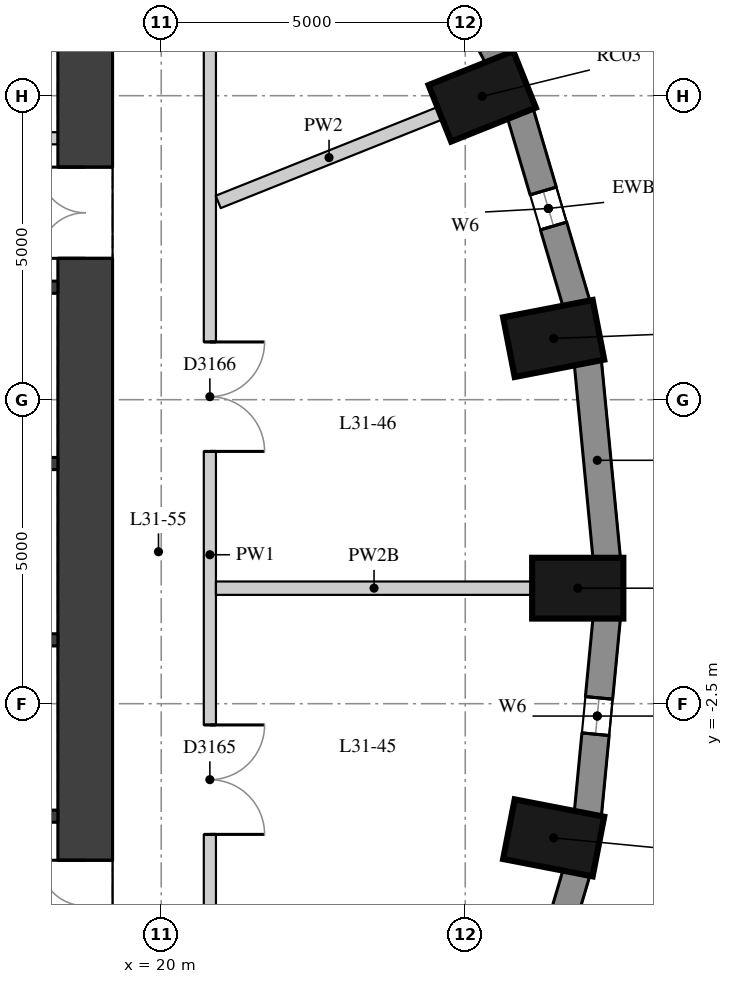
"""IFC4 building model, lengths in metres.
Left out: names, types, materials, properties, quantities, classifications, styles, units other than length and angle.
Written with IfcOpenShell. Run it as: python <this file> out.ifc"""

import sys

from ifc_helpers import new_model, si_unit, direction, frame, frame_2d, origin, origin_2d, place, context, subcontext, project, spatial, rectangle, extrude, element, fill, save


model = new_model("IFC4")
c1 = context("Model", 3, precision=1e-05, world=origin(), true_north=direction((0.0, 1.0)))
c2 = subcontext(c1, "Body", "Model", "MODEL_VIEW")
j1 = project(units=[si_unit("LENGTHUNIT", "METRE"), si_unit("PLANEANGLEUNIT", "RADIAN")], contexts=[c1])
p1 = place(None, origin())
s1 = spatial("IfcSite", under=j1, at=p1, CompositionType="ELEMENT")
p2 = place(p1, origin())
s2 = spatial("IfcBuilding", under=s1, at=p2, CompositionType="ELEMENT")
p3 = place(p2, frame((0.0, 0.0, 112.0)))
s3 = spatial("IfcBuildingStorey", under=s2, at=p3, CompositionType="ELEMENT", Elevation=112.0)
for number, where, z_axis, x_axis in (
    (1, (26.85, -0.6, 0.0), (0.0, 0.0, 1.0), (1.0, 0.0, 0.0)),
    (2, (26.454, 3.507, 0.0), (0.0, 0.0, 1.0), (0.982, 0.19, 0.0)),
    (3, (25.279, 7.489, 0.0), (0.0, 0.0, 1.0), (0.929, 0.371, 0.0)),
    (4, (26.454, -4.707, 0.0), (0.0, 0.0, 1.0), (0.982, -0.19, 0.0)),
):
    element("IfcColumn", number, at=place(p3, frame(where, z_axis=z_axis, x_axis=x_axis)), inside=s3, PredefinedType="COLUMN", context=c2, shape_type="SweptSolid", body=[
        extrude(rectangle(XDim=1.5, YDim=1.0, at=origin_2d()), origin(), (0.0, 0.0, 1.0), 3.3),
    ])
p4 = place(p3, frame((27.328, -0.12, 0.0), z_axis=(0.0, 0.0, 1.0), x_axis=(-0.09589355735, 0.995391594127, 0.0)))
e5 = element("IfcWall", 5, at=p4, inside=s3, PredefinedType="SOLIDWALL", context=c2, shape_type="SweptSolid", body=[
    extrude(rectangle(XDim=3.261, YDim=0.45, at=frame_2d((1.631, 0.0))), origin(), (0.0, 0.0, 1.0), 3.02),
])
p5 = place(p3, frame((26.832, 4.069, 0.0), z_axis=(0.0, 0.0, 1.0), x_axis=(-0.283002902729, 0.959119052593, 0.0)))
e6 = element("IfcWall", 6, at=p5, inside=s3, PredefinedType="SOLIDWALL", context=c2, shape_type="SweptSolid", body=[
    extrude(rectangle(XDim=3.286, YDim=0.45, at=frame_2d((1.643, 0.0))), origin(), (0.0, 0.0, 1.0), 3.02),
])
p6 = place(p5, frame((1.343, 0.0, 0.4)))
e7 = element("IfcOpeningElement", 7, at=p6, cuts=e6, PredefinedType="OPENING", context=c2, shape_type="SweptSolid", body=[
    extrude(rectangle(XDim=0.6, YDim=1.75, at=frame_2d((0.3, 0.875))), frame((0.0, 0.235, 0.0), z_axis=(0.0, -1.0, 0.0), x_axis=(1.0, 0.0, 0.0)), (0.0, 0.0, 1.0), 0.47),
])
p7 = place(p3, frame((25.545, 8.112, 0.0), z_axis=(0.0, 0.0, 1.0), x_axis=(-0.456828186229, 0.889554949549, 0.0)))
e8 = element("IfcWall", 8, at=p7, inside=s3, PredefinedType="SOLIDWALL", context=c2, shape_type="SweptSolid", body=[
    extrude(rectangle(XDim=3.333, YDim=0.45, at=frame_2d((1.667, 0.0))), origin(), (0.0, 0.0, 1.0), 3.02),
])
p8 = place(p3, frame((25.902, -8.421, 0.0), z_axis=(0.0, 0.0, 1.0), x_axis=(0.282982737009, 0.95912500257, 0.0)))
e9 = element("IfcWall", 9, at=p8, inside=s3, PredefinedType="SOLIDWALL", context=c2, shape_type="SweptSolid", body=[
    extrude(rectangle(XDim=3.286, YDim=0.45, at=frame_2d((1.643, 0.0))), origin(), (0.0, 0.0, 1.0), 3.02),
])
p9 = place(p3, frame((27.015, -4.326, 0.0), z_axis=(0.0, 0.0, 1.0), x_axis=(0.09589355735, 0.995391594127, 0.0)))
e10 = element("IfcWall", 10, at=p9, inside=s3, PredefinedType="SOLIDWALL", context=c2, shape_type="SweptSolid", body=[
    extrude(rectangle(XDim=3.261, YDim=0.45, at=frame_2d((1.631, 0.0))), origin(), (0.0, 0.0, 1.0), 3.02),
])
p10 = place(p9, frame((1.331, 0.0, 0.4)))
e11 = element("IfcOpeningElement", 11, at=p10, cuts=e10, PredefinedType="OPENING", context=c2, shape_type="SweptSolid", body=[
    extrude(rectangle(XDim=0.6, YDim=1.75, at=frame_2d((0.3, 0.875))), frame((0.0, 0.235, 0.0), z_axis=(0.0, -1.0, 0.0), x_axis=(1.0, 0.0, 0.0)), (0.0, 0.0, 1.0), 0.47),
])
p11 = place(p3, frame((18.75, -11.1, 0.0), z_axis=(0.0, 0.0, 1.0), x_axis=(0.0, 1.0, 0.0)))
e12 = element("IfcWall", 12, at=p11, inside=s3, PredefinedType="SHEAR", context=c2, shape_type="SweptSolid", body=[
    extrude(rectangle(XDim=22.2, YDim=0.9, at=frame_2d((11.1, 0.0))), origin(), (0.0, 0.0, 1.0), 3.02),
])
p12 = place(p11, frame((15.925, 0.0, 0.0)))
e13 = element("IfcOpeningElement", 13, at=p12, cuts=e12, PredefinedType="OPENING", context=c2, shape_type="SweptSolid", body=[
    extrude(rectangle(XDim=1.5, YDim=2.1, at=frame_2d((0.75, 1.05))), frame((0.0, 0.46, 0.0), z_axis=(0.0, -1.0, 0.0), x_axis=(1.0, 0.0, 0.0)), (0.0, 0.0, 1.0), 0.92),
])
p13 = place(p11, frame((4.525, 0.0, 0.0)))
e14 = element("IfcOpeningElement", 14, at=p13, cuts=e12, PredefinedType="OPENING", context=c2, shape_type="SweptSolid", body=[
    extrude(rectangle(XDim=1.5, YDim=2.1, at=frame_2d((0.75, 1.05))), frame((0.0, 0.46, 0.0), z_axis=(0.0, -1.0, 0.0), x_axis=(1.0, 0.0, 0.0)), (0.0, 0.0, 1.0), 0.92),
])
for number, where, z_axis, x_axis in (
    (15, (16.0, -4.35, 0.0), (0.0, 0.0, 1.0), (1.0, 0.0, 0.0)),
    (16, (16.0, -1.45, 0.0), (0.0, 0.0, 1.0), (1.0, 0.0, 0.0)),
    (17, (16.0, 1.45, 0.0), (0.0, 0.0, 1.0), (1.0, 0.0, 0.0)),
    (18, (16.0, 4.35, 0.0), (0.0, 0.0, 1.0), (1.0, 0.0, 0.0)),
):
    element("IfcWall", number, at=place(p3, frame(where, z_axis=z_axis, x_axis=x_axis)), inside=s3, PredefinedType="SHEAR", context=c2, shape_type="SweptSolid", body=[
        extrude(rectangle(XDim=2.3, YDim=0.2, at=frame_2d((1.15, 0.0))), origin(), (0.0, 0.0, 1.0), 3.02),
    ])
p14 = place(p3, frame((16.0, 6.8, 0.0), z_axis=(0.0, 0.0, 1.0), x_axis=(1.0, 0.0, 0.0)))
e19 = element("IfcWall", 19, at=p14, inside=s3, PredefinedType="PARTITIONING", context=c2, shape_type="SweptSolid", body=[
    extrude(rectangle(XDim=2.3, YDim=0.2, at=frame_2d((1.15, 0.0))), origin(), (0.0, 0.0, 1.0), 3.02),
])
p15 = place(p14, frame((0.1, 0.0, 0.0)))
e20 = element("IfcOpeningElement", 20, at=p15, cuts=e19, PredefinedType="OPENING", context=c2, shape_type="SweptSolid", body=[
    extrude(rectangle(XDim=0.9, YDim=2.1, at=frame_2d((0.45, 1.05))), frame((0.0, 0.11, 0.0), z_axis=(0.0, -1.0, 0.0), x_axis=(1.0, 0.0, 0.0)), (0.0, 0.0, 1.0), 0.22),
])
p16 = place(p3, frame((20.8, 13.5, 0.0), z_axis=(0.0, 0.0, 1.0), x_axis=(0.0, -1.0, 0.0)))
e21 = element("IfcWall", 21, at=p16, inside=s3, PredefinedType="PARTITIONING", context=c2, shape_type="SweptSolid", body=[
    extrude(rectangle(XDim=27.1, YDim=0.2, at=frame_2d((13.55, 0.0))), origin(), (0.0, 0.0, 1.0), 3.02),
])
p17 = place(p16, frame((22.844, 0.0, 0.0)))
e22 = element("IfcOpeningElement", 22, at=p17, cuts=e21, PredefinedType="OPENING", context=c2, shape_type="SweptSolid", body=[
    extrude(rectangle(XDim=1.8, YDim=2.1, at=frame_2d((0.9, 1.05))), frame((0.0, 0.11, 0.0), z_axis=(0.0, -1.0, 0.0), x_axis=(1.0, 0.0, 0.0)), (0.0, 0.0, 1.0), 0.22),
])
p18 = place(p16, frame((16.35, 0.0, 0.0)))
e23 = element("IfcOpeningElement", 23, at=p18, cuts=e21, PredefinedType="OPENING", context=c2, shape_type="SweptSolid", body=[
    extrude(rectangle(XDim=1.8, YDim=2.1, at=frame_2d((0.9, 1.05))), frame((0.0, 0.11, 0.0), z_axis=(0.0, -1.0, 0.0), x_axis=(1.0, 0.0, 0.0)), (0.0, 0.0, 1.0), 0.22),
])
p19 = place(p16, frame((10.051, 0.0, 0.0)))
e24 = element("IfcOpeningElement", 24, at=p19, cuts=e21, PredefinedType="OPENING", context=c2, shape_type="SweptSolid", body=[
    extrude(rectangle(XDim=1.8, YDim=2.1, at=frame_2d((0.9, 1.05))), frame((0.0, 0.11, 0.0), z_axis=(0.0, -1.0, 0.0), x_axis=(1.0, 0.0, 0.0)), (0.0, 0.0, 1.0), 0.22),
])
p20 = place(p3, frame((26.1, -0.6, 0.0), z_axis=(0.0, 0.0, 1.0), x_axis=(-1.0, 0.0, 0.0)))
e25 = element("IfcWall", 25, at=p20, inside=s3, PredefinedType="PARTITIONING", context=c2, shape_type="SweptSolid", body=[
    extrude(rectangle(XDim=5.2, YDim=0.22, at=frame_2d((2.6, 0.0))), origin(), (0.0, 0.0, 1.0), 2.57),
])
p21 = place(p3, frame((24.583, 7.21, 0.0), z_axis=(0.0, 0.0, 1.0), x_axis=(-0.928528147853, -0.371262008083, 0.0)))
e26 = element("IfcWall", 26, at=p21, inside=s3, PredefinedType="PARTITIONING", context=c2, shape_type="SweptSolid", body=[
    extrude(rectangle(XDim=3.926, YDim=0.22, at=frame_2d((1.963, 0.0))), origin(), (0.0, 0.0, 1.0), 3.02),
])
p22 = place(p6, origin())
e27 = element("IfcWindow", 27, at=p22, inside=s3, PartitioningType="SINGLE_PANEL", PredefinedType="WINDOW", context=c2, shape_type="SweptSolid", body=[
    extrude(rectangle(XDim=0.6, YDim=1.75, at=frame_2d((0.3, 0.875))), frame((0.0, 0.035, 0.0), z_axis=(0.0, -1.0, 0.0), x_axis=(1.0, 0.0, 0.0)), (0.0, 0.0, 1.0), 0.06),
])
fill(e7, e27)
p23 = place(p10, origin())
e28 = element("IfcWindow", 28, at=p23, inside=s3, PartitioningType="SINGLE_PANEL", PredefinedType="WINDOW", context=c2, shape_type="SweptSolid", body=[
    extrude(rectangle(XDim=0.6, YDim=1.75, at=frame_2d((0.3, 0.875))), frame((0.0, 0.035, 0.0), z_axis=(0.0, -1.0, 0.0), x_axis=(1.0, 0.0, 0.0)), (0.0, 0.0, 1.0), 0.06),
])
fill(e11, e28)
p24 = place(p12, origin())
e29 = element("IfcDoor", 29, at=p24, inside=s3, OperationType="DOUBLE_DOOR_SINGLE_SWING", PredefinedType="DOOR", context=c2, shape_type="SweptSolid", body=[
    extrude(rectangle(XDim=1.5, YDim=2.1, at=frame_2d((0.75, 1.05))), frame((0.0, 0.025, 0.0), z_axis=(0.0, -1.0, 0.0), x_axis=(1.0, 0.0, 0.0)), (0.0, 0.0, 1.0), 0.05),
])
fill(e13, e29)
p25 = place(p13, origin())
e30 = element("IfcDoor", 30, at=p25, inside=s3, OperationType="DOUBLE_DOOR_SINGLE_SWING", PredefinedType="DOOR", context=c2, shape_type="SweptSolid", body=[
    extrude(rectangle(XDim=1.5, YDim=2.1, at=frame_2d((0.75, 1.05))), frame((0.0, 0.025, 0.0), z_axis=(0.0, -1.0, 0.0), x_axis=(1.0, 0.0, 0.0)), (0.0, 0.0, 1.0), 0.05),
])
fill(e14, e30)
p26 = place(p18, origin())
e31 = element("IfcDoor", 31, at=p26, inside=s3, OperationType="DOUBLE_DOOR_SINGLE_SWING", PredefinedType="DOOR", context=c2, shape_type="SweptSolid", body=[
    extrude(rectangle(XDim=1.8, YDim=2.1, at=frame_2d((0.9, 1.05))), frame((0.0, 0.025, 0.0), z_axis=(0.0, -1.0, 0.0), x_axis=(1.0, 0.0, 0.0)), (0.0, 0.0, 1.0), 0.05),
])
fill(e23, e31)
p27 = place(p19, origin())
e32 = element("IfcDoor", 32, at=p27, inside=s3, OperationType="DOUBLE_DOOR_SINGLE_SWING", PredefinedType="DOOR", context=c2, shape_type="SweptSolid", body=[
    extrude(rectangle(XDim=1.8, YDim=2.1, at=frame_2d((0.9, 1.05))), frame((0.0, 0.025, 0.0), z_axis=(0.0, -1.0, 0.0), x_axis=(1.0, 0.0, 0.0)), (0.0, 0.0, 1.0), 0.05),
])
fill(e24, e32)
save(model, sys.argv[1])
